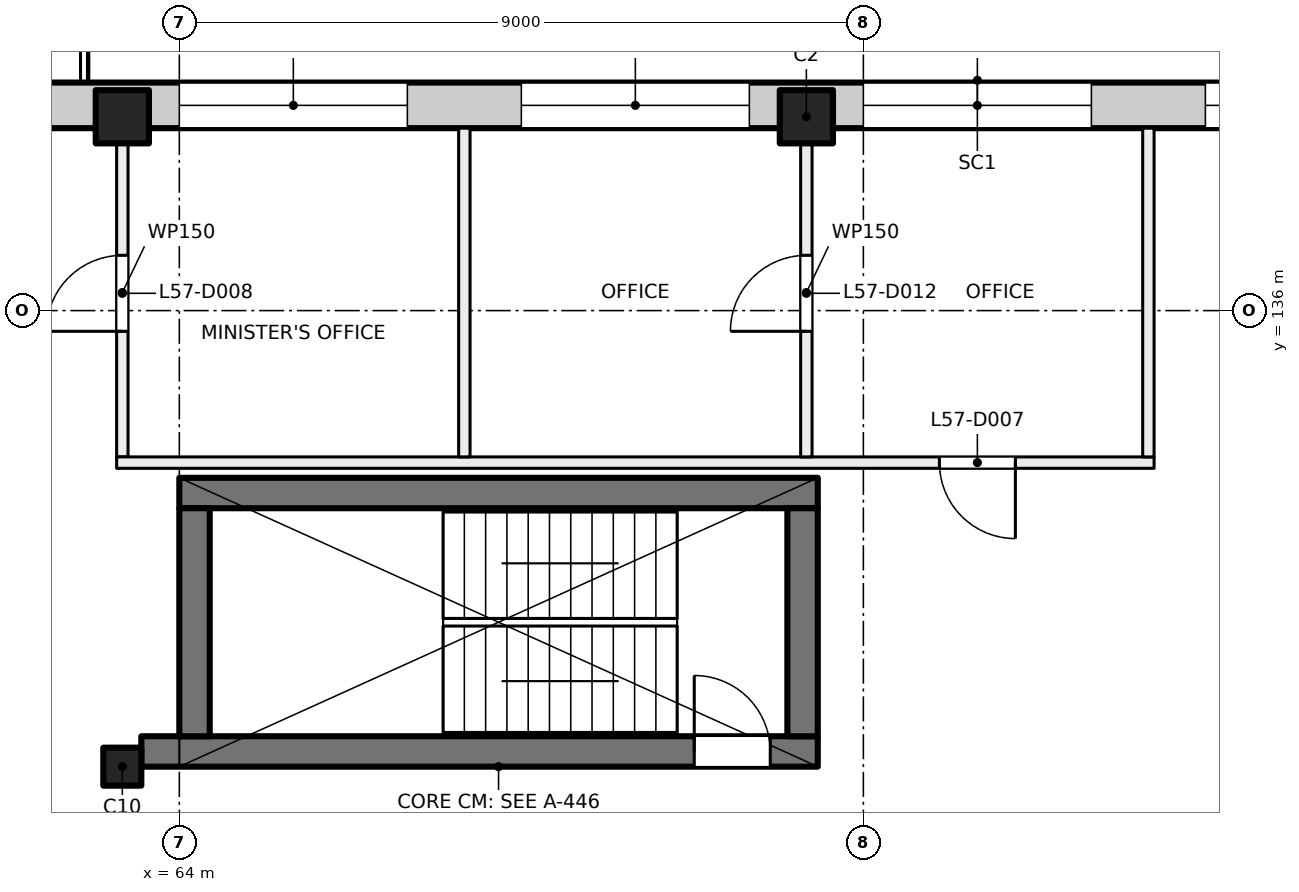
"""IFC4 building model, lengths in metres.
Left out: names, types, materials, properties, quantities, classifications, styles, units other than length and angle.
Written with IfcOpenShell. Run it as: python <this file> out.ifc"""

import sys

from ifc_helpers import new_model, si_unit, direction, frame, frame_2d, origin, origin_2d, place, context, subcontext, project, spatial, rectangle, extrude, element, fill, save


model = new_model("IFC4")
c1 = context("Model", 3, precision=1e-05, world=origin(), true_north=direction((0.0, 1.0)))
c2 = subcontext(c1, "Body", "Model", "MODEL_VIEW")
j1 = project(units=[si_unit("LENGTHUNIT", "METRE"), si_unit("PLANEANGLEUNIT", "RADIAN")], contexts=[c1])
p1 = place(None, origin())
s1 = spatial("IfcSite", under=j1, at=p1, CompositionType="ELEMENT")
p2 = place(p1, origin())
s2 = spatial("IfcBuilding", under=s1, at=p2, CompositionType="ELEMENT")
p3 = place(p2, frame((0.0, 0.0, 241.5)))
s3 = spatial("IfcBuildingStorey", under=s2, at=p3, CompositionType="ELEMENT", Elevation=241.5)
p4 = place(p3, frame((63.25, 130.0, 0.0), z_axis=(0.0, 0.0, 1.0), x_axis=(1.0, 0.0, 0.0)))
e1 = element("IfcColumn", 1, at=p4, inside=s3, PredefinedType="COLUMN", context=c2, shape_type="SweptSolid", body=[
    extrude(rectangle(XDim=0.5, YDim=0.5, at=origin_2d()), origin(), (0.0, 0.0, 1.0), 4.0),
])
for number, where, z_axis, x_axis in (
    (2, (63.25, 138.55, 0.0), (0.0, 0.0, 1.0), (1.0, 0.0, 0.0)),
    (3, (72.25, 138.55, 0.0), (0.0, 0.0, 1.0), (1.0, 0.0, 0.0)),
):
    element("IfcColumn", number, at=place(p3, frame(where, z_axis=z_axis, x_axis=x_axis)), inside=s3, PredefinedType="COLUMN", context=c2, shape_type="SweptSolid", body=[
        extrude(rectangle(XDim=0.7, YDim=0.7, at=origin_2d()), origin(), (0.0, 0.0, 1.0), 4.0),
    ])
p5 = place(p3, frame((63.5, 130.2, 0.0), z_axis=(0.0, 0.0, 1.0), x_axis=(1.0, 0.0, 0.0)))
e4 = element("IfcWall", 4, at=p5, inside=s3, PredefinedType="SHEAR", context=c2, shape_type="SweptSolid", body=[
    extrude(rectangle(XDim=8.9, YDim=0.4, at=frame_2d((4.45, 0.0))), origin(), (0.0, 0.0, 1.0), 4.0),
])
p6 = place(p5, frame((7.275, 0.0, 0.0)))
e5 = element("IfcOpeningElement", 5, at=p6, cuts=e4, PredefinedType="OPENING", context=c2, shape_type="SweptSolid", body=[
    extrude(rectangle(XDim=1.0, YDim=2.1, at=frame_2d((0.5, 1.05))), frame((0.0, 0.21, 0.0), z_axis=(0.0, -1.0, 0.0), x_axis=(1.0, 0.0, 0.0)), (0.0, 0.0, 1.0), 0.42),
])
p7 = place(p3, frame((64.0, 133.6, 0.0), z_axis=(0.0, 0.0, 1.0), x_axis=(1.0, 0.0, 0.0)))
e6 = element("IfcWall", 6, at=p7, inside=s3, PredefinedType="SHEAR", context=c2, shape_type="SweptSolid", body=[
    extrude(rectangle(XDim=8.4, YDim=0.4, at=frame_2d((4.2, 0.0))), origin(), (0.0, 0.0, 1.0), 4.0),
])
for number, where, z_axis, x_axis in (
    (7, (64.2, 130.4, 0.0), (0.0, 0.0, 1.0), (0.0, 1.0, 0.0)),
    (8, (72.2, 130.4, 0.0), (0.0, 0.0, 1.0), (0.0, 1.0, 0.0)),
):
    element("IfcWall", number, at=place(p3, frame(where, z_axis=z_axis, x_axis=x_axis)), inside=s3, PredefinedType="SHEAR", context=c2, shape_type="SweptSolid", body=[
        extrude(rectangle(XDim=3.0, YDim=0.4, at=frame_2d((1.5, 0.0))), origin(), (0.0, 0.0, 1.0), 4.0),
    ])
p8 = place(p3, frame((47.07, 138.7, 0.0), z_axis=(0.0, 0.0, 1.0), x_axis=(1.0, 0.0, 0.0)))
e9 = element("IfcWall", 9, at=p8, inside=s3, PredefinedType="SOLIDWALL", context=c2, shape_type="SweptSolid", body=[
    extrude(rectangle(XDim=43.91, YDim=0.6, at=frame_2d((21.955, 0.0))), origin(), (0.0, 0.0, 1.0), 3.625),
])
p9 = place(p8, frame((3.43, 0.0, 0.9)))
e10 = element("IfcOpeningElement", 10, at=p9, cuts=e9, PredefinedType="OPENING", context=c2, shape_type="SweptSolid", body=[
    extrude(rectangle(XDim=3.0, YDim=2.4, at=frame_2d((1.5, 1.2))), frame((0.0, 0.31, 0.0), z_axis=(0.0, -1.0, 0.0), x_axis=(1.0, 0.0, 0.0)), (0.0, 0.0, 1.0), 0.62),
])
p10 = place(p8, frame((7.93, 0.0, 0.9)))
e11 = element("IfcOpeningElement", 11, at=p10, cuts=e9, PredefinedType="OPENING", context=c2, shape_type="SweptSolid", body=[
    extrude(rectangle(XDim=3.0, YDim=2.4, at=frame_2d((1.5, 1.2))), frame((0.0, 0.31, 0.0), z_axis=(0.0, -1.0, 0.0), x_axis=(1.0, 0.0, 0.0)), (0.0, 0.0, 1.0), 0.62),
])
p11 = place(p8, frame((13.03, 0.0, 0.0)))
e12 = element("IfcOpeningElement", 12, at=p11, cuts=e9, PredefinedType="OPENING", context=c2, shape_type="SweptSolid", body=[
    extrude(rectangle(XDim=1.8, YDim=2.4, at=frame_2d((0.9, 1.2))), frame((0.0, 0.31, 0.0), z_axis=(0.0, -1.0, 0.0), x_axis=(1.0, 0.0, 0.0)), (0.0, 0.0, 1.0), 0.62),
])
p12 = place(p8, frame((16.93, 0.0, 0.9)))
e13 = element("IfcOpeningElement", 13, at=p12, cuts=e9, PredefinedType="OPENING", context=c2, shape_type="SweptSolid", body=[
    extrude(rectangle(XDim=3.0, YDim=2.4, at=frame_2d((1.5, 1.2))), frame((0.0, 0.31, 0.0), z_axis=(0.0, -1.0, 0.0), x_axis=(1.0, 0.0, 0.0)), (0.0, 0.0, 1.0), 0.62),
])
p13 = place(p8, frame((21.43, 0.0, 0.9)))
e14 = element("IfcOpeningElement", 14, at=p13, cuts=e9, PredefinedType="OPENING", context=c2, shape_type="SweptSolid", body=[
    extrude(rectangle(XDim=3.0, YDim=2.4, at=frame_2d((1.5, 1.2))), frame((0.0, 0.31, 0.0), z_axis=(0.0, -1.0, 0.0), x_axis=(1.0, 0.0, 0.0)), (0.0, 0.0, 1.0), 0.62),
])
p14 = place(p8, frame((25.93, 0.0, 0.9)))
e15 = element("IfcOpeningElement", 15, at=p14, cuts=e9, PredefinedType="OPENING", context=c2, shape_type="SweptSolid", body=[
    extrude(rectangle(XDim=3.0, YDim=2.4, at=frame_2d((1.5, 1.2))), frame((0.0, 0.31, 0.0), z_axis=(0.0, -1.0, 0.0), x_axis=(1.0, 0.0, 0.0)), (0.0, 0.0, 1.0), 0.62),
])
p15 = place(p8, frame((30.43, 0.0, 0.9)))
e16 = element("IfcOpeningElement", 16, at=p15, cuts=e9, PredefinedType="OPENING", context=c2, shape_type="SweptSolid", body=[
    extrude(rectangle(XDim=3.0, YDim=2.4, at=frame_2d((1.5, 1.2))), frame((0.0, 0.31, 0.0), z_axis=(0.0, -1.0, 0.0), x_axis=(1.0, 0.0, 0.0)), (0.0, 0.0, 1.0), 0.62),
])
p16 = place(p8, frame((34.93, 0.0, 0.9)))
e17 = element("IfcOpeningElement", 17, at=p16, cuts=e9, PredefinedType="OPENING", context=c2, shape_type="SweptSolid", body=[
    extrude(rectangle(XDim=3.0, YDim=2.4, at=frame_2d((1.5, 1.2))), frame((0.0, 0.31, 0.0), z_axis=(0.0, -1.0, 0.0), x_axis=(1.0, 0.0, 0.0)), (0.0, 0.0, 1.0), 0.62),
])
p17 = place(p8, frame((39.43, 0.0, 0.9)))
e18 = element("IfcOpeningElement", 18, at=p17, cuts=e9, PredefinedType="OPENING", context=c2, shape_type="SweptSolid", body=[
    extrude(rectangle(XDim=3.0, YDim=2.4, at=frame_2d((1.5, 1.2))), frame((0.0, 0.31, 0.0), z_axis=(0.0, -1.0, 0.0), x_axis=(1.0, 0.0, 0.0)), (0.0, 0.0, 1.0), 0.62),
])
p18 = place(p3, frame((63.25, 134.075, 0.0), z_axis=(0.0, 0.0, 1.0), x_axis=(0.0, 1.0, 0.0)))
e19 = element("IfcWall", 19, at=p18, inside=s3, PredefinedType="PARTITIONING", context=c2, shape_type="SweptSolid", body=[
    extrude(rectangle(XDim=4.325, YDim=0.15, at=frame_2d((2.163, 0.0))), origin(), (0.0, 0.0, 1.0), 3.625),
])
p19 = place(p18, frame((1.653, 0.0, 0.0)))
e20 = element("IfcOpeningElement", 20, at=p19, cuts=e19, PredefinedType="OPENING", context=c2, shape_type="SweptSolid", body=[
    extrude(rectangle(XDim=1.0, YDim=2.1, at=frame_2d((0.5, 1.05))), frame((0.0, 0.085, 0.0), z_axis=(0.0, -1.0, 0.0), x_axis=(1.0, 0.0, 0.0)), (0.0, 0.0, 1.0), 0.17),
])
p20 = place(p3, frame((76.825, 134.0, 0.0), z_axis=(0.0, 0.0, 1.0), x_axis=(-1.0, 0.0, 0.0)))
e21 = element("IfcWall", 21, at=p20, inside=s3, PredefinedType="PARTITIONING", context=c2, shape_type="SweptSolid", body=[
    extrude(rectangle(XDim=13.65, YDim=0.15, at=frame_2d((6.825, 0.0))), origin(), (0.0, 0.0, 1.0), 3.625),
])
p21 = place(p20, frame((1.825, 0.0, 0.0)))
e22 = element("IfcOpeningElement", 22, at=p21, cuts=e21, PredefinedType="OPENING", context=c2, shape_type="SweptSolid", body=[
    extrude(rectangle(XDim=1.0, YDim=2.1, at=frame_2d((0.5, 1.05))), frame((0.0, 0.085, 0.0), z_axis=(0.0, -1.0, 0.0), x_axis=(1.0, 0.0, 0.0)), (0.0, 0.0, 1.0), 0.17),
])
p22 = place(p3, frame((67.75, 134.075, 0.0), z_axis=(0.0, 0.0, 1.0), x_axis=(0.0, 1.0, 0.0)))
e23 = element("IfcWall", 23, at=p22, inside=s3, PredefinedType="PARTITIONING", context=c2, shape_type="SweptSolid", body=[
    extrude(rectangle(XDim=4.325, YDim=0.15, at=frame_2d((2.163, 0.0))), origin(), (0.0, 0.0, 1.0), 3.625),
])
p23 = place(p3, frame((72.25, 134.075, 0.0), z_axis=(0.0, 0.0, 1.0), x_axis=(0.0, 1.0, 0.0)))
e24 = element("IfcWall", 24, at=p23, inside=s3, PredefinedType="PARTITIONING", context=c2, shape_type="SweptSolid", body=[
    extrude(rectangle(XDim=4.325, YDim=0.15, at=frame_2d((2.163, 0.0))), origin(), (0.0, 0.0, 1.0), 3.625),
])
p24 = place(p23, frame((1.653, 0.0, 0.0)))
e25 = element("IfcOpeningElement", 25, at=p24, cuts=e24, PredefinedType="OPENING", context=c2, shape_type="SweptSolid", body=[
    extrude(rectangle(XDim=1.0, YDim=2.1, at=frame_2d((0.5, 1.05))), frame((0.0, 0.085, 0.0), z_axis=(0.0, -1.0, 0.0), x_axis=(1.0, 0.0, 0.0)), (0.0, 0.0, 1.0), 0.17),
])
p25 = place(p3, frame((76.75, 138.4, 0.0), z_axis=(0.0, 0.0, 1.0), x_axis=(0.0, -1.0, 0.0)))
e26 = element("IfcWall", 26, at=p25, inside=s3, PredefinedType="PARTITIONING", context=c2, shape_type="SweptSolid", body=[
    extrude(rectangle(XDim=4.325, YDim=0.15, at=frame_2d((2.163, 0.0))), origin(), (0.0, 0.0, 1.0), 3.625),
])
p26 = place(p12, origin())
e27 = element("IfcWindow", 27, at=p26, inside=s3, PartitioningType="SINGLE_PANEL", PredefinedType="WINDOW", context=c2, shape_type="SweptSolid", body=[
    extrude(rectangle(XDim=3.0, YDim=2.4, at=frame_2d((1.5, 1.2))), frame((0.0, 0.03, 0.0), z_axis=(0.0, -1.0, 0.0), x_axis=(1.0, 0.0, 0.0)), (0.0, 0.0, 1.0), 0.06),
])
fill(e13, e27)
p27 = place(p13, origin())
e28 = element("IfcWindow", 28, at=p27, inside=s3, PartitioningType="SINGLE_PANEL", PredefinedType="WINDOW", context=c2, shape_type="SweptSolid", body=[
    extrude(rectangle(XDim=3.0, YDim=2.4, at=frame_2d((1.5, 1.2))), frame((0.0, 0.03, 0.0), z_axis=(0.0, -1.0, 0.0), x_axis=(1.0, 0.0, 0.0)), (0.0, 0.0, 1.0), 0.06),
])
fill(e14, e28)
p28 = place(p14, origin())
e29 = element("IfcWindow", 29, at=p28, inside=s3, PartitioningType="SINGLE_PANEL", PredefinedType="WINDOW", context=c2, shape_type="SweptSolid", body=[
    extrude(rectangle(XDim=3.0, YDim=2.4, at=frame_2d((1.5, 1.2))), frame((0.0, 0.03, 0.0), z_axis=(0.0, -1.0, 0.0), x_axis=(1.0, 0.0, 0.0)), (0.0, 0.0, 1.0), 0.06),
])
fill(e15, e29)
p29 = place(p15, origin())
e30 = element("IfcWindow", 30, at=p29, inside=s3, PartitioningType="SINGLE_PANEL", PredefinedType="WINDOW", context=c2, shape_type="SweptSolid", body=[
    extrude(rectangle(XDim=3.0, YDim=2.4, at=frame_2d((1.5, 1.2))), frame((0.0, 0.03, 0.0), z_axis=(0.0, -1.0, 0.0), x_axis=(1.0, 0.0, 0.0)), (0.0, 0.0, 1.0), 0.06),
])
fill(e16, e30)
p30 = place(p6, origin())
e31 = element("IfcDoor", 31, at=p30, inside=s3, OperationType="SINGLE_SWING_LEFT", PredefinedType="DOOR", context=c2, shape_type="SweptSolid", body=[
    extrude(rectangle(XDim=1.0, YDim=2.1, at=frame_2d((0.5, 1.05))), frame((0.0, 0.025, 0.0), z_axis=(0.0, -1.0, 0.0), x_axis=(1.0, 0.0, 0.0)), (0.0, 0.0, 1.0), 0.05),
])
fill(e5, e31)
p31 = place(p21, origin())
e32 = element("IfcDoor", 32, at=p31, inside=s3, OperationType="SINGLE_SWING_LEFT", PredefinedType="DOOR", context=c2, shape_type="SweptSolid", body=[
    extrude(rectangle(XDim=1.0, YDim=2.1, at=frame_2d((0.5, 1.05))), frame((0.0, 0.025, 0.0), z_axis=(0.0, -1.0, 0.0), x_axis=(1.0, 0.0, 0.0)), (0.0, 0.0, 1.0), 0.05),
])
fill(e22, e32)
p32 = place(p19, origin())
e33 = element("IfcDoor", 33, at=p32, inside=s3, OperationType="SINGLE_SWING_LEFT", PredefinedType="DOOR", context=c2, shape_type="SweptSolid", body=[
    extrude(rectangle(XDim=1.0, YDim=2.1, at=frame_2d((0.5, 1.05))), frame((0.0, 0.025, 0.0), z_axis=(0.0, -1.0, 0.0), x_axis=(1.0, 0.0, 0.0)), (0.0, 0.0, 1.0), 0.05),
])
fill(e20, e33)
p33 = place(p24, origin())
e34 = element("IfcDoor", 34, at=p33, inside=s3, OperationType="SINGLE_SWING_LEFT", PredefinedType="DOOR", context=c2, shape_type="SweptSolid", body=[
    extrude(rectangle(XDim=1.0, YDim=2.1, at=frame_2d((0.5, 1.05))), frame((0.0, 0.025, 0.0), z_axis=(0.0, -1.0, 0.0), x_axis=(1.0, 0.0, 0.0)), (0.0, 0.0, 1.0), 0.05),
])
fill(e25, e34)
save(model, sys.argv[1])
